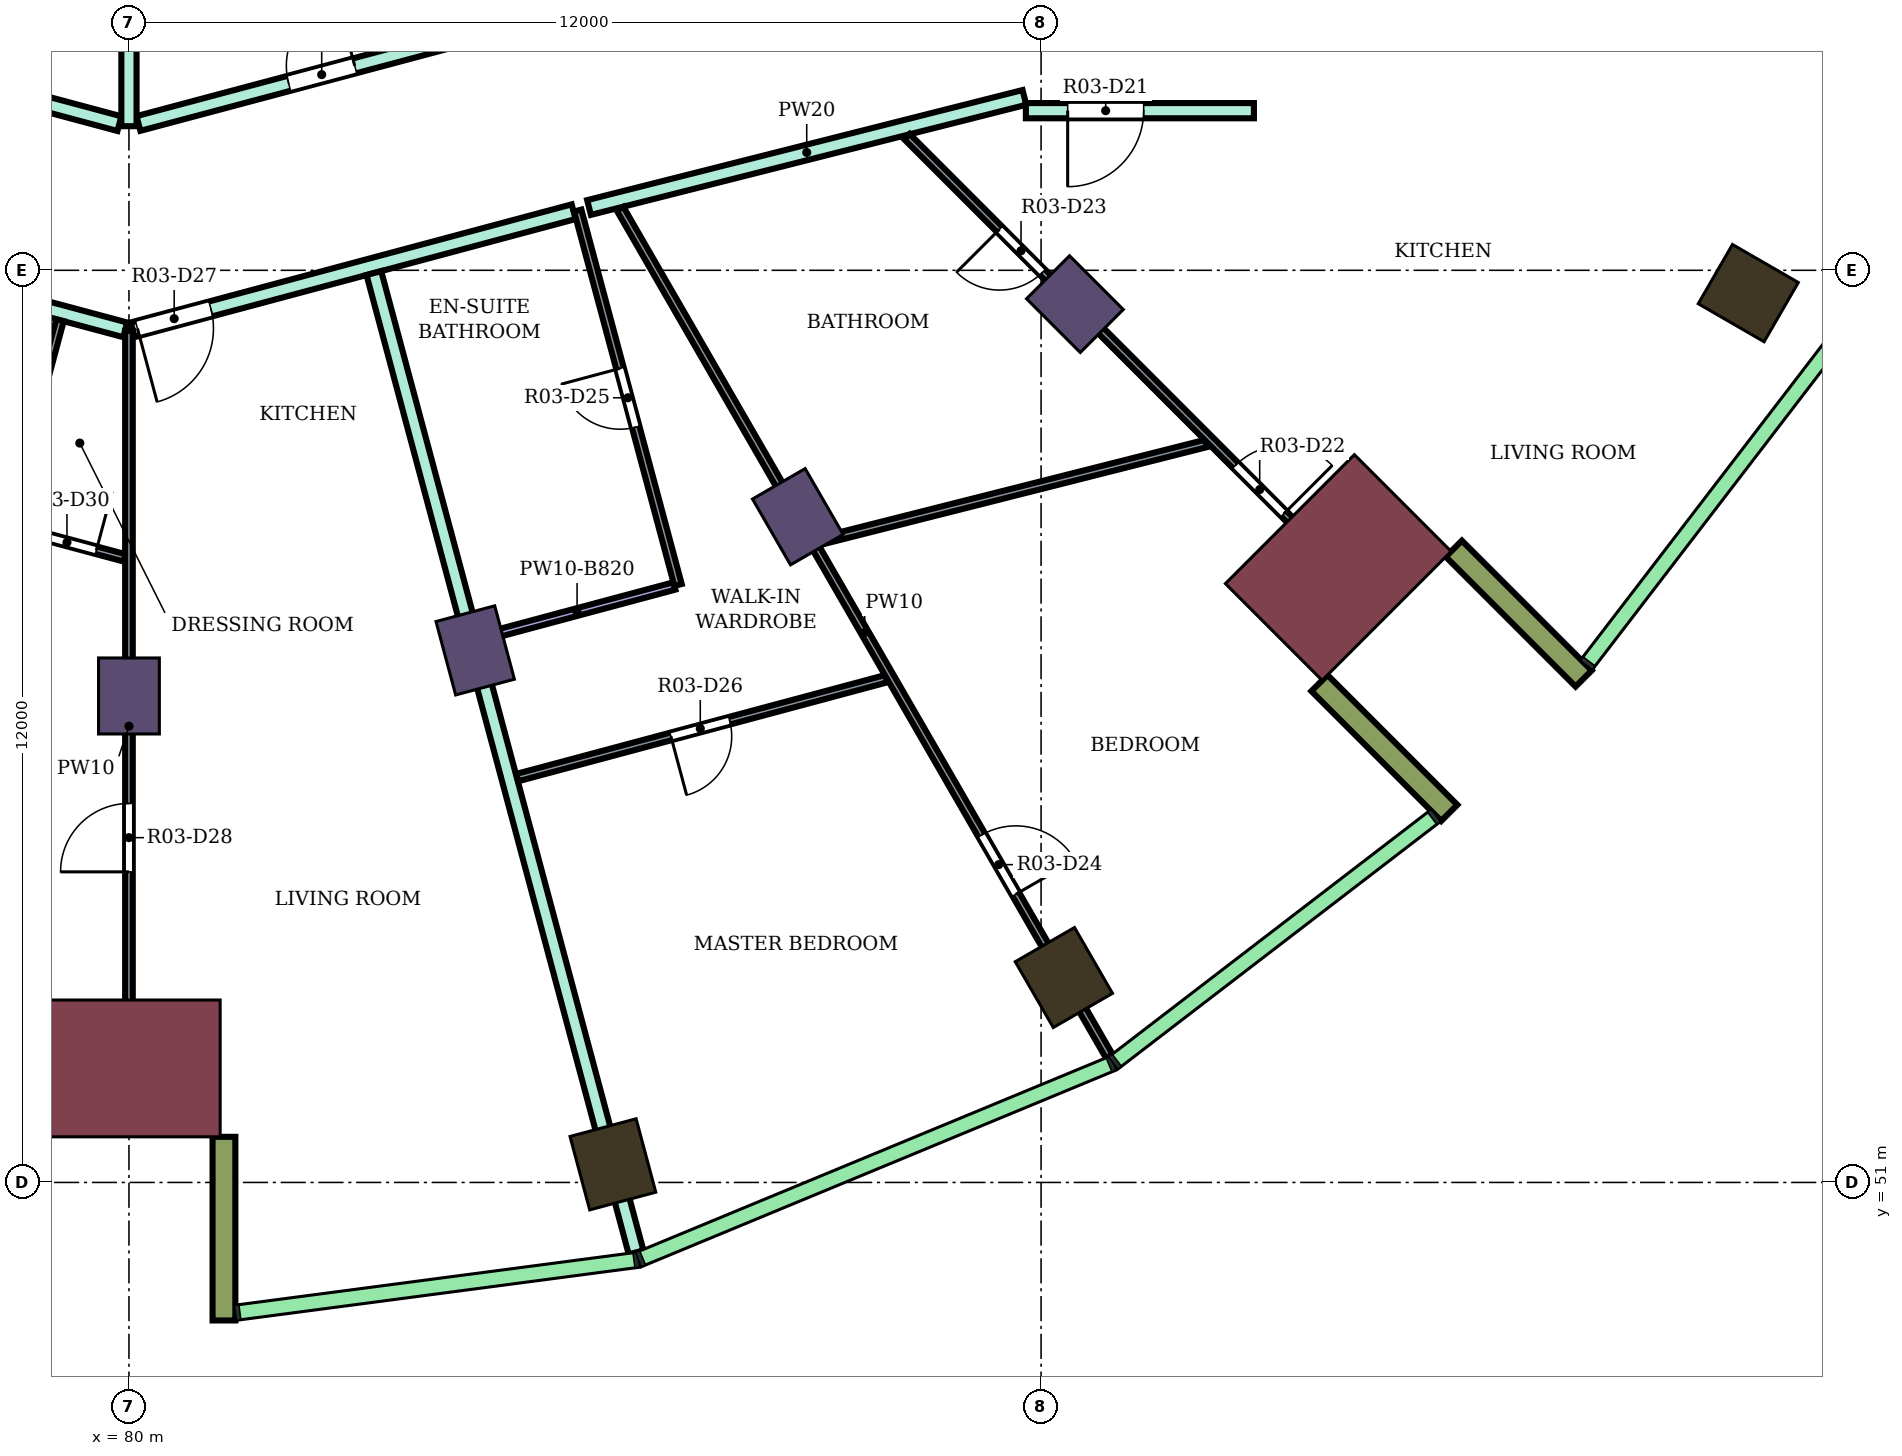
"""IFC4 building model, lengths in metres.
Left out: names, types, materials, properties, quantities, classifications, styles, units other than length and angle.
Written with IfcOpenShell. Run it as: python <this file> out.ifc"""

import sys

from ifc_helpers import new_model, si_unit, direction, frame, frame_2d, origin, origin_2d, place, context, subcontext, project, spatial, rectangle, extrude, element, fill, save


model = new_model("IFC4")
c1 = context("Model", 3, precision=1e-05, world=origin(), true_north=direction((0.0, 1.0)))
c2 = subcontext(c1, "Body", "Model", "MODEL_VIEW")
j1 = project(units=[si_unit("LENGTHUNIT", "METRE"), si_unit("PLANEANGLEUNIT", "RADIAN")], contexts=[c1])
p1 = place(None, origin())
s1 = spatial("IfcSite", under=j1, at=p1, CompositionType="ELEMENT")
p2 = place(p1, origin())
s2 = spatial("IfcBuilding", under=s1, at=p2, CompositionType="ELEMENT")
p3 = place(p2, frame((0.0, 0.0, 182.3)))
s3 = spatial("IfcBuildingStorey", under=s2, at=p3, CompositionType="ELEMENT", Elevation=182.3)
for number, where, z_axis, x_axis in (
    (1, (86.367, 51.238, 0.0), (0.0, 0.0, 1.0), (0.259, -0.966, 0.0)),
    (2, (92.3, 53.696, 0.0), (0.0, 0.0, 1.0), (0.5, -0.866, 0.0)),
    (3, (101.304, 62.7, 0.0), (0.0, 0.0, 1.0), (0.866, -0.5, 0.0)),
):
    element("IfcColumn", number, at=place(p3, frame(where, z_axis=z_axis, x_axis=x_axis)), inside=s3, PredefinedType="COLUMN", context=c2, shape_type="SweptSolid", body=[
        extrude(rectangle(XDim=1.0, YDim=0.9, at=origin_2d()), origin(), (0.0, 0.0, 1.0), 4.1),
    ])
for number, where, z_axis, x_axis in (
    (4, (80.0, 57.4, 0.0), (0.0, 0.0, 1.0), (0.0, -1.0, 0.0)),
    (5, (84.555, 58.0, 0.0), (0.0, 0.0, 1.0), (0.259, -0.966, 0.0)),
    (6, (88.8, 59.758, 0.0), (0.0, 0.0, 1.0), (0.5, -0.866, 0.0)),
    (7, (92.445, 62.555, 0.0), (0.0, 0.0, 1.0), (0.707, -0.707, 0.0)),
):
    element("IfcColumn", number, at=place(p3, frame(where, z_axis=z_axis, x_axis=x_axis)), inside=s3, PredefinedType="COLUMN", context=c2, shape_type="SweptSolid", body=[
        extrude(rectangle(XDim=1.0, YDim=0.8, at=origin_2d()), origin(), (0.0, 0.0, 1.0), 4.1),
    ])
for number, where, z_axis, x_axis in (
    (8, (80.0, 52.5, 0.0), (0.0, 0.0, 1.0), (0.0, -1.0, 0.0)),
    (9, (95.91, 59.09, 0.0), (0.0, 0.0, 1.0), (0.707, -0.707, 0.0)),
):
    element("IfcColumn", number, at=place(p3, frame(where, z_axis=z_axis, x_axis=x_axis)), inside=s3, PredefinedType="COLUMN", context=c2, shape_type="SweptSolid", body=[
        extrude(rectangle(XDim=1.8, YDim=2.4, at=origin_2d()), origin(), (0.0, 0.0, 1.0), 4.1),
    ])
for number, where, z_axis, x_axis in (
    (10, (81.25, 51.6, 0.0), (0.0, 0.0, 1.0), (0.0, -1.0, 0.0)),
    (11, (95.662, 57.57, 0.0), (0.0, 0.0, 1.0), (0.707, -0.707, 0.0)),
    (12, (97.43, 59.338, 0.0), (0.0, 0.0, 1.0), (0.707, -0.707, 0.0)),
):
    element("IfcWall", number, at=place(p3, frame(where, z_axis=z_axis, x_axis=x_axis)), inside=s3, PredefinedType="NOTDEFINED", context=c2, shape_type="SweptSolid", body=[
        extrude(rectangle(XDim=2.416, YDim=0.3, at=frame_2d((1.208, 0.0))), origin(), (0.0, 0.0, 1.0), 4.1),
    ])
p4 = place(p3, frame((73.947, 63.826, 0.0), z_axis=(0.0, 0.0, 1.0), x_axis=(0.965898432367, -0.258921258979, 0.0)))
e13 = element("IfcWall", 13, at=p4, inside=s3, PredefinedType="PARTITIONING", context=c2, shape_type="SweptSolid", body=[
    extrude(rectangle(XDim=6.217, YDim=0.2, at=frame_2d((3.108, 0.0))), origin(), (0.0, 0.0, 1.0), 3.65),
])
p5 = place(p4, frame((1.424, 0.0, 0.0)))
e14 = element("IfcOpeningElement", 14, at=p5, cuts=e13, PredefinedType="OPENING", context=c2, shape_type="SweptSolid", body=[
    extrude(rectangle(XDim=1.0, YDim=2.1, at=frame_2d((0.5, 1.05))), frame((0.0, 0.11, 0.0), z_axis=(0.0, -1.0, 0.0), x_axis=(1.0, 0.0, 0.0)), (0.0, 0.0, 1.0), 0.22),
])
p6 = place(p3, frame((74.603, 66.342, 0.0), z_axis=(0.0, 0.0, 1.0), x_axis=(0.965920893652, -0.258837453254, 0.0)))
e15 = element("IfcWall", 15, at=p6, inside=s3, PredefinedType="PARTITIONING", context=c2, shape_type="SweptSolid", body=[
    extrude(rectangle(XDim=5.458, YDim=0.2, at=frame_2d((2.729, 0.0))), origin(), (0.0, 0.0, 1.0), 3.65),
])
p7 = place(p6, frame((2.512, 0.0, 0.0)))
e16 = element("IfcOpeningElement", 16, at=p7, cuts=e15, PredefinedType="OPENING", context=c2, shape_type="SweptSolid", body=[
    extrude(rectangle(XDim=0.9, YDim=2.1, at=frame_2d((0.45, 1.05))), frame((0.0, 0.11, 0.0), z_axis=(0.0, -1.0, 0.0), x_axis=(1.0, 0.0, 0.0)), (0.0, 0.0, 1.0), 0.22),
])
p8 = place(p3, frame((80.125, 64.932, 0.0), z_axis=(0.0, 0.0, 1.0), x_axis=(0.966236955806, 0.257655089674, 0.0)))
e17 = element("IfcWall", 17, at=p8, inside=s3, PredefinedType="PARTITIONING", context=c2, shape_type="SweptSolid", body=[
    extrude(rectangle(XDim=8.039, YDim=0.2, at=frame_2d((4.02, 0.0))), origin(), (0.0, 0.0, 1.0), 3.65),
])
p9 = place(p8, frame((6.298, 0.0, 0.0)))
e18 = element("IfcOpeningElement", 18, at=p9, cuts=e17, PredefinedType="OPENING", context=c2, shape_type="SweptSolid", body=[
    extrude(rectangle(XDim=0.9, YDim=2.1, at=frame_2d((0.45, 1.05))), frame((0.0, 0.11, 0.0), z_axis=(0.0, -1.0, 0.0), x_axis=(1.0, 0.0, 0.0)), (0.0, 0.0, 1.0), 0.22),
])
p10 = place(p8, frame((2.045, 0.0, 0.0)))
e19 = element("IfcOpeningElement", 19, at=p10, cuts=e17, PredefinedType="OPENING", context=c2, shape_type="SweptSolid", body=[
    extrude(rectangle(XDim=0.9, YDim=2.1, at=frame_2d((0.45, 1.05))), frame((0.0, 0.11, 0.0), z_axis=(0.0, -1.0, 0.0), x_axis=(1.0, 0.0, 0.0)), (0.0, 0.0, 1.0), 0.22),
])
p11 = place(p3, frame((80.048, 62.217, 0.0), z_axis=(0.0, 0.0, 1.0), x_axis=(0.965967276872, 0.258664299841, 0.0)))
e20 = element("IfcWall", 20, at=p11, inside=s3, PredefinedType="PARTITIONING", context=c2, shape_type="SweptSolid", body=[
    extrude(rectangle(XDim=6.007, YDim=0.2, at=frame_2d((3.003, 0.0))), origin(), (0.0, 0.0, 1.0), 3.65),
])
p12 = place(p11, frame((0.066, 0.0, 0.0)))
e21 = element("IfcOpeningElement", 21, at=p12, cuts=e20, PredefinedType="OPENING", context=c2, shape_type="SweptSolid", body=[
    extrude(rectangle(XDim=1.0, YDim=2.1, at=frame_2d((0.5, 1.05))), frame((0.0, 0.11, 0.0), z_axis=(0.0, -1.0, 0.0), x_axis=(1.0, 0.0, 0.0)), (0.0, 0.0, 1.0), 0.22),
])
p13 = place(p3, frame((80.0, 64.896, 0.0), z_axis=(0.0, 0.0, 1.0), x_axis=(0.0, 1.0, 0.0)))
e22 = element("IfcWall", 22, at=p13, inside=s3, PredefinedType="PARTITIONING", context=c2, shape_type="SweptSolid", body=[
    extrude(rectangle(XDim=2.405, YDim=0.2, at=frame_2d((1.203, 0.0))), origin(), (0.0, 0.0, 1.0), 3.65),
])
p14 = place(p3, frame((83.222, 62.964, 0.0), z_axis=(0.0, 0.0, 1.0), x_axis=(0.25865252128, -0.965970430829, 0.0)))
e23 = element("IfcWall", 23, at=p14, inside=s3, PredefinedType="PARTITIONING", context=c2, shape_type="SweptSolid", body=[
    extrude(rectangle(XDim=13.338, YDim=0.2, at=frame_2d((6.669, 0.0))), origin(), (0.0, 0.0, 1.0), 3.65),
])
p15 = place(p3, frame((86.053, 63.826, 0.0), z_axis=(0.0, 0.0, 1.0), x_axis=(0.969490004987, 0.245130843083, 0.0)))
e24 = element("IfcWall", 24, at=p15, inside=s3, PredefinedType="PARTITIONING", context=c2, shape_type="SweptSolid", body=[
    extrude(rectangle(XDim=5.908, YDim=0.2, at=frame_2d((2.954, 0.0))), origin(), (0.0, 0.0, 1.0), 3.65),
])
p16 = place(p3, frame((91.8, 65.1, 0.0), z_axis=(0.0, 0.0, 1.0), x_axis=(1.0, 0.0, 0.0)))
e25 = element("IfcWall", 25, at=p16, inside=s3, PredefinedType="PARTITIONING", context=c2, shape_type="SweptSolid", body=[
    extrude(rectangle(XDim=3.0, YDim=0.2, at=frame_2d((1.5, 0.0))), origin(), (0.0, 0.0, 1.0), 3.65),
])
p17 = place(p16, frame((0.55, 0.0, 0.0)))
e26 = element("IfcOpeningElement", 26, at=p17, cuts=e25, PredefinedType="OPENING", context=c2, shape_type="SweptSolid", body=[
    extrude(rectangle(XDim=1.0, YDim=2.1, at=frame_2d((0.5, 1.05))), frame((0.0, 0.11, 0.0), z_axis=(0.0, -1.0, 0.0), x_axis=(1.0, 0.0, 0.0)), (0.0, 0.0, 1.0), 0.22),
])
p18 = place(p3, frame((76.147, 60.234, 0.0), z_axis=(0.0, 0.0, 1.0), x_axis=(0.965925861199, -0.258818914816, 0.0)))
e27 = element("IfcWall", 27, at=p18, inside=s3, PredefinedType="PARTITIONING", context=c2, shape_type="SweptSolid", body=[
    extrude(rectangle(XDim=3.929, YDim=0.1, at=frame_2d((1.964, 0.0))), origin(), (0.0, 0.0, 1.0), 3.65),
])
p19 = place(p18, frame((0.7, 0.0, 0.0)))
e28 = element("IfcOpeningElement", 28, at=p19, cuts=e27, PredefinedType="OPENING", context=c2, shape_type="SweptSolid", body=[
    extrude(rectangle(XDim=0.8, YDim=2.1, at=frame_2d((0.4, 1.05))), frame((0.0, 0.06, 0.0), z_axis=(0.0, -1.0, 0.0), x_axis=(1.0, 0.0, 0.0)), (0.0, 0.0, 1.0), 0.12),
])
p20 = place(p18, frame((2.745, 0.0, 0.0)))
e29 = element("IfcOpeningElement", 29, at=p20, cuts=e27, PredefinedType="OPENING", context=c2, shape_type="SweptSolid", body=[
    extrude(rectangle(XDim=0.8, YDim=2.1, at=frame_2d((0.4, 1.05))), frame((0.0, 0.06, 0.0), z_axis=(0.0, -1.0, 0.0), x_axis=(1.0, 0.0, 0.0)), (0.0, 0.0, 1.0), 0.12),
])
p21 = place(p3, frame((78.382, 59.687, 0.0), z_axis=(0.0, 0.0, 1.0), x_axis=(0.258629573817, 0.965976575051, 0.0)))
e30 = element("IfcWall", 30, at=p21, inside=s3, PredefinedType="PARTITIONING", context=c2, shape_type="SweptSolid", body=[
    extrude(rectangle(XDim=2.75, YDim=0.1, at=frame_2d((1.375, 0.0))), origin(), (0.0, 0.0, 1.0), 3.65),
])
p22 = place(p3, frame((80.0, 51.8, 0.0), z_axis=(0.0, 0.0, 1.0), x_axis=(0.0, 1.0, 0.0)))
e31 = element("IfcWall", 31, at=p22, inside=s3, PredefinedType="PARTITIONING", context=c2, shape_type="SweptSolid", body=[
    extrude(rectangle(XDim=10.404, YDim=0.1, at=frame_2d((5.202, 0.0))), origin(), (0.0, 0.0, 1.0), 3.65),
])
p23 = place(p22, frame((3.286, 0.0, 0.0)))
e32 = element("IfcOpeningElement", 32, at=p23, cuts=e31, PredefinedType="OPENING", context=c2, shape_type="SweptSolid", body=[
    extrude(rectangle(XDim=0.9, YDim=2.1, at=frame_2d((0.45, 1.05))), frame((0.0, 0.06, 0.0), z_axis=(0.0, -1.0, 0.0), x_axis=(1.0, 0.0, 0.0)), (0.0, 0.0, 1.0), 0.12),
])
p24 = place(p3, frame((84.615, 58.161, 0.0), z_axis=(0.0, 0.0, 1.0), x_axis=(0.965902408875, 0.258906424273, 0.0)))
e33 = element("IfcWall", 33, at=p24, inside=s3, PredefinedType="PARTITIONING", context=c2, shape_type="SweptSolid", body=[
    extrude(rectangle(XDim=2.651, YDim=0.1, at=frame_2d((1.325, 0.0))), origin(), (0.0, 0.0, 1.0), 3.28),
])
p25 = place(p3, frame((85.108, 56.326, 0.0), z_axis=(0.0, 0.0, 1.0), x_axis=(0.965919870225, 0.258841272413, 0.0)))
e34 = element("IfcWall", 34, at=p25, inside=s3, PredefinedType="PARTITIONING", context=c2, shape_type="SweptSolid", body=[
    extrude(rectangle(XDim=5.027, YDim=0.1, at=frame_2d((2.514, 0.0))), origin(), (0.0, 0.0, 1.0), 3.65),
])
p26 = place(p25, frame((2.094, 0.0, 0.0)))
e35 = element("IfcOpeningElement", 35, at=p26, cuts=e34, PredefinedType="OPENING", context=c2, shape_type="SweptSolid", body=[
    extrude(rectangle(XDim=0.8, YDim=2.1, at=frame_2d((0.4, 1.05))), frame((0.0, 0.06, 0.0), z_axis=(0.0, -1.0, 0.0), x_axis=(1.0, 0.0, 0.0)), (0.0, 0.0, 1.0), 0.12),
])
p27 = place(p3, frame((85.904, 63.786, 0.0), z_axis=(0.0, 0.0, 1.0), x_axis=(0.258857329124, -0.965915567303, 0.0)))
e36 = element("IfcWall", 36, at=p27, inside=s3, PredefinedType="PARTITIONING", context=c2, shape_type="SweptSolid", body=[
    extrude(rectangle(XDim=5.1, YDim=0.1, at=frame_2d((2.55, 0.0))), origin(), (0.0, 0.0, 1.0), 3.65),
])
p28 = place(p27, frame((2.15, 0.0, 0.0)))
e37 = element("IfcOpeningElement", 37, at=p28, cuts=e36, PredefinedType="OPENING", context=c2, shape_type="SweptSolid", body=[
    extrude(rectangle(XDim=0.8, YDim=2.1, at=frame_2d((0.4, 1.05))), frame((0.0, 0.06, 0.0), z_axis=(0.0, -1.0, 0.0), x_axis=(1.0, 0.0, 0.0)), (0.0, 0.0, 1.0), 0.12),
])
p29 = place(p3, frame((86.461, 63.81, 0.0), z_axis=(0.0, 0.0, 1.0), x_axis=(0.499911751641, -0.866076348004, 0.0)))
e38 = element("IfcWall", 38, at=p29, inside=s3, PredefinedType="PARTITIONING", context=c2, shape_type="SweptSolid", body=[
    extrude(rectangle(XDim=12.876, YDim=0.1, at=frame_2d((6.438, 0.0))), origin(), (0.0, 0.0, 1.0), 3.65),
])
p30 = place(p29, frame((9.514, 0.0, 0.0)))
e39 = element("IfcOpeningElement", 39, at=p30, cuts=e38, PredefinedType="OPENING", context=c2, shape_type="SweptSolid", body=[
    extrude(rectangle(XDim=0.9, YDim=2.1, at=frame_2d((0.45, 1.05))), frame((0.0, 0.06, 0.0), z_axis=(0.0, -1.0, 0.0), x_axis=(1.0, 0.0, 0.0)), (0.0, 0.0, 1.0), 0.12),
])
p31 = place(p3, frame((89.058, 59.429, 0.0), z_axis=(0.0, 0.0, 1.0), x_axis=(0.96946321375, 0.2452367778, 0.0)))
e40 = element("IfcWall", 40, at=p31, inside=s3, PredefinedType="PARTITIONING", context=c2, shape_type="SweptSolid", body=[
    extrude(rectangle(XDim=5.272, YDim=0.1, at=frame_2d((2.636, 0.0))), origin(), (0.0, 0.0, 1.0), 3.65),
])
p32 = place(p3, frame((90.236, 64.758, 0.0), z_axis=(0.0, 0.0, 1.0), x_axis=(0.706924769926, -0.707288745609, 0.0)))
e41 = element("IfcWall", 41, at=p32, inside=s3, PredefinedType="PARTITIONING", context=c2, shape_type="SweptSolid", body=[
    extrude(rectangle(XDim=8.72, YDim=0.1, at=frame_2d((4.36, 0.0))), origin(), (0.0, 0.0, 1.0), 3.65),
])
p33 = place(p32, frame((6.114, 0.0, 0.0)))
e42 = element("IfcOpeningElement", 42, at=p33, cuts=e41, PredefinedType="OPENING", context=c2, shape_type="SweptSolid", body=[
    extrude(rectangle(XDim=0.9, YDim=2.1, at=frame_2d((0.45, 1.05))), frame((0.0, 0.06, 0.0), z_axis=(0.0, -1.0, 0.0), x_axis=(1.0, 0.0, 0.0)), (0.0, 0.0, 1.0), 0.12),
])
p34 = place(p32, frame((1.722, 0.0, 0.0)))
e43 = element("IfcOpeningElement", 43, at=p34, cuts=e41, PredefinedType="OPENING", context=c2, shape_type="SweptSolid", body=[
    extrude(rectangle(XDim=0.8, YDim=2.1, at=frame_2d((0.4, 1.05))), frame((0.0, 0.06, 0.0), z_axis=(0.0, -1.0, 0.0), x_axis=(1.0, 0.0, 0.0)), (0.0, 0.0, 1.0), 0.12),
])
p35 = place(p17, frame((1.0, 0.0, 0.0), z_axis=(0.0, 0.0, 1.0), x_axis=(-1.0, 0.0, 0.0)))
e44 = element("IfcDoor", 44, at=p35, inside=s3, OperationType="SINGLE_SWING_RIGHT", PredefinedType="DOOR", context=c2, shape_type="SweptSolid", body=[
    extrude(rectangle(XDim=1.0, YDim=2.1, at=frame_2d((0.5, 1.05))), frame((0.0, 0.025, 0.0), z_axis=(0.0, -1.0, 0.0), x_axis=(1.0, 0.0, 0.0)), (0.0, 0.0, 1.0), 0.05),
])
fill(e26, e44)
p36 = place(p33, origin())
e45 = element("IfcDoor", 45, at=p36, inside=s3, OperationType="SINGLE_SWING_RIGHT", PredefinedType="DOOR", context=c2, shape_type="SweptSolid", body=[
    extrude(rectangle(XDim=0.9, YDim=2.1, at=frame_2d((0.45, 1.05))), frame((0.0, 0.025, 0.0), z_axis=(0.0, -1.0, 0.0), x_axis=(1.0, 0.0, 0.0)), (0.0, 0.0, 1.0), 0.05),
])
fill(e42, e45)
p37 = place(p34, frame((0.8, 0.0, 0.0), z_axis=(0.0, 0.0, 1.0), x_axis=(-1.0, 0.0, 0.0)))
e46 = element("IfcDoor", 46, at=p37, inside=s3, OperationType="SINGLE_SWING_RIGHT", PredefinedType="DOOR", context=c2, shape_type="SweptSolid", body=[
    extrude(rectangle(XDim=0.8, YDim=2.1, at=frame_2d((0.4, 1.05))), frame((0.0, 0.025, 0.0), z_axis=(0.0, -1.0, 0.0), x_axis=(1.0, 0.0, 0.0)), (0.0, 0.0, 1.0), 0.05),
])
fill(e43, e46)
p38 = place(p30, origin())
e47 = element("IfcDoor", 47, at=p38, inside=s3, OperationType="SINGLE_SWING_RIGHT", PredefinedType="DOOR", context=c2, shape_type="SweptSolid", body=[
    extrude(rectangle(XDim=0.9, YDim=2.1, at=frame_2d((0.45, 1.05))), frame((0.0, 0.025, 0.0), z_axis=(0.0, -1.0, 0.0), x_axis=(1.0, 0.0, 0.0)), (0.0, 0.0, 1.0), 0.05),
])
fill(e39, e47)
p39 = place(p28, frame((0.8, 0.0, 0.0), z_axis=(0.0, 0.0, 1.0), x_axis=(-1.0, 0.0, 0.0)))
e48 = element("IfcDoor", 48, at=p39, inside=s3, OperationType="SINGLE_SWING_RIGHT", PredefinedType="DOOR", context=c2, shape_type="SweptSolid", body=[
    extrude(rectangle(XDim=0.8, YDim=2.1, at=frame_2d((0.4, 1.05))), frame((0.0, 0.025, 0.0), z_axis=(0.0, -1.0, 0.0), x_axis=(1.0, 0.0, 0.0)), (0.0, 0.0, 1.0), 0.05),
])
fill(e37, e48)
p40 = place(p26, frame((0.8, 0.0, 0.0), z_axis=(0.0, 0.0, 1.0), x_axis=(-1.0, 0.0, 0.0)))
e49 = element("IfcDoor", 49, at=p40, inside=s3, OperationType="SINGLE_SWING_RIGHT", PredefinedType="DOOR", context=c2, shape_type="SweptSolid", body=[
    extrude(rectangle(XDim=0.8, YDim=2.1, at=frame_2d((0.4, 1.05))), frame((0.0, 0.025, 0.0), z_axis=(0.0, -1.0, 0.0), x_axis=(1.0, 0.0, 0.0)), (0.0, 0.0, 1.0), 0.05),
])
fill(e35, e49)
p41 = place(p12, frame((1.0, 0.0, 0.0), z_axis=(0.0, 0.0, 1.0), x_axis=(-1.0, 0.0, 0.0)))
e50 = element("IfcDoor", 50, at=p41, inside=s3, OperationType="SINGLE_SWING_RIGHT", PredefinedType="DOOR", context=c2, shape_type="SweptSolid", body=[
    extrude(rectangle(XDim=1.0, YDim=2.1, at=frame_2d((0.5, 1.05))), frame((0.0, 0.025, 0.0), z_axis=(0.0, -1.0, 0.0), x_axis=(1.0, 0.0, 0.0)), (0.0, 0.0, 1.0), 0.05),
])
fill(e21, e50)
p42 = place(p23, origin())
e51 = element("IfcDoor", 51, at=p42, inside=s3, OperationType="SINGLE_SWING_LEFT", PredefinedType="DOOR", context=c2, shape_type="SweptSolid", body=[
    extrude(rectangle(XDim=0.9, YDim=2.1, at=frame_2d((0.45, 1.05))), frame((0.0, 0.025, 0.0), z_axis=(0.0, -1.0, 0.0), x_axis=(1.0, 0.0, 0.0)), (0.0, 0.0, 1.0), 0.05),
])
fill(e32, e51)
p43 = place(p20, origin())
e52 = element("IfcDoor", 52, at=p43, inside=s3, OperationType="SINGLE_SWING_RIGHT", PredefinedType="DOOR", context=c2, shape_type="SweptSolid", body=[
    extrude(rectangle(XDim=0.8, YDim=2.1, at=frame_2d((0.4, 1.05))), frame((0.0, 0.025, 0.0), z_axis=(0.0, -1.0, 0.0), x_axis=(1.0, 0.0, 0.0)), (0.0, 0.0, 1.0), 0.05),
])
fill(e29, e52)
p44 = place(p10, origin())
e53 = element("IfcDoor", 53, at=p44, inside=s3, OperationType="SINGLE_SWING_RIGHT", PredefinedType="DOOR", context=c2, shape_type="SweptSolid", body=[
    extrude(rectangle(XDim=0.9, YDim=2.1, at=frame_2d((0.45, 1.05))), frame((0.0, 0.025, 0.0), z_axis=(0.0, -1.0, 0.0), x_axis=(1.0, 0.0, 0.0)), (0.0, 0.0, 1.0), 0.05),
])
fill(e19, e53)
save(model, sys.argv[1])
